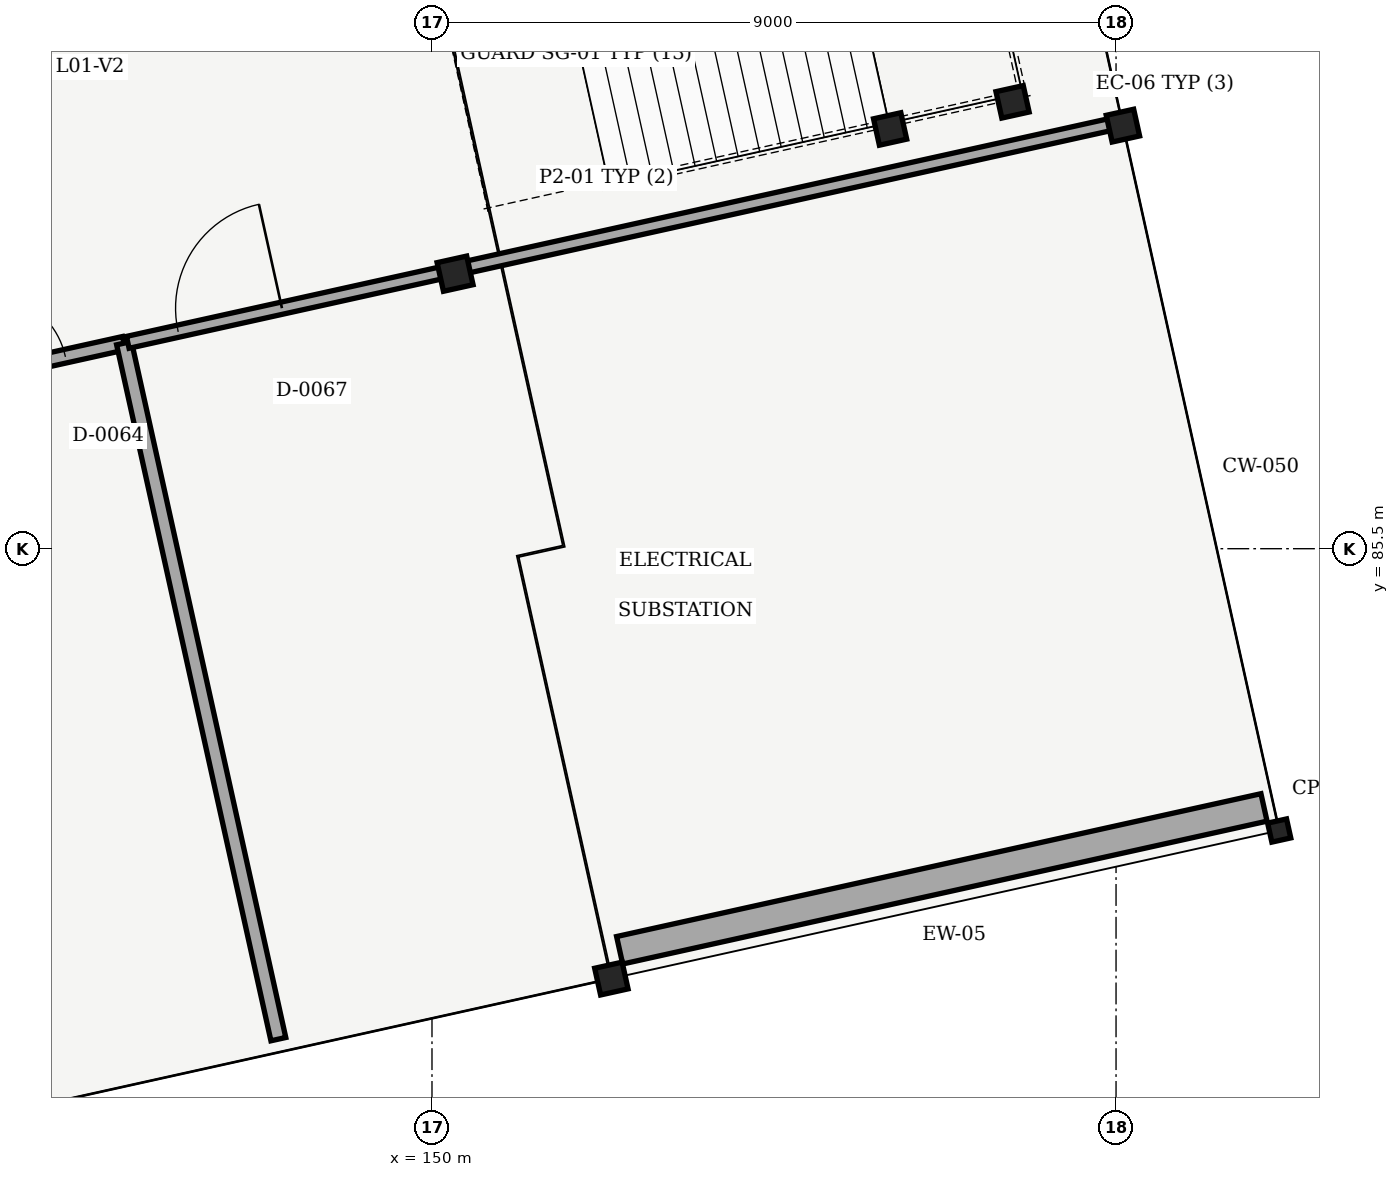
"""IFC4 building model, lengths in metres.
Left out: names, types, materials, properties, quantities, classifications, styles, units other than length and angle.
Written with IfcOpenShell. Run it as: python <this file> out.ifc"""

import sys

from ifc_helpers import new_model, si_unit, direction, frame, frame_2d, origin, origin_with_axes, origin_2d, place, context, subcontext, project, spatial, rectangle, i_section, extrude, element, fill, save


model = new_model("IFC4")
c1 = context("Model", 3, precision=1e-05, world=origin(), true_north=direction((0.0, 1.0)))
c2 = subcontext(c1, "Body", "Model", "MODEL_VIEW")
j1 = project(units=[si_unit("LENGTHUNIT", "METRE"), si_unit("PLANEANGLEUNIT", "RADIAN")], contexts=[c1])
p1 = place(None, origin())
s1 = spatial("IfcSite", under=j1, at=p1, CompositionType="ELEMENT")
p2 = place(p1, origin())
s2 = spatial("IfcBuilding", under=s1, at=p2, CompositionType="ELEMENT")
p3 = place(p2, frame((0.0, 0.0, 4.8)))
s3 = spatial("IfcBuildingStorey", under=s2, at=p3, CompositionType="ELEMENT", Elevation=4.8)
p4 = place(p3, frame((152.36, 79.844, 0.0), z_axis=(0.0, 0.0, 1.0), x_axis=(0.97629600712, 0.216439613938, 0.0)))
e1 = element("IfcColumn", 1, at=p4, inside=s3, PredefinedType="COLUMN", context=c2, shape_type="SweptSolid", body=[
    extrude(i_section(OverallWidth=0.37, OverallDepth=0.36, WebThickness=0.012, FlangeThickness=0.02, FilletRadius=0.015, at=origin_2d()), origin(), (0.0, 0.0, 1.0), 4.8),
])
p5 = place(p3, frame((150.304, 89.119, 0.0), z_axis=(0.0, 0.0, 1.0), x_axis=(0.97629600712, 0.216439613938, 0.0)))
e2 = element("IfcColumn", 2, at=p5, inside=s3, PredefinedType="COLUMN", context=c2, shape_type="SweptSolid", body=[
    extrude(i_section(OverallWidth=0.399, OverallDepth=0.386, WebThickness=0.021, FlangeThickness=0.033, FilletRadius=0.015, at=origin_2d()), origin(), (0.0, 0.0, 1.0), 4.8),
])
p6 = place(p3, frame((161.147, 81.792, 0.0), z_axis=(0.0, 0.0, 1.0), x_axis=(0.97629600712, 0.216439613938, 0.0)))
e3 = element("IfcColumn", 3, at=p6, inside=s3, PredefinedType="PILASTER", context=c2, shape_type="SweptSolid", body=[
    extrude(i_section(OverallWidth=0.255, OverallDepth=0.256, WebThickness=0.01, FlangeThickness=0.016, FilletRadius=0.009, at=origin_2d()), origin(), (0.0, 0.0, 1.0), 4.8),
])
p7 = place(p3, frame((159.091, 91.067, 0.0), z_axis=(0.0, 0.0, 1.0), x_axis=(0.97629600712, 0.216439613938, 0.0)))
e4 = element("IfcColumn", 4, at=p7, inside=s3, PredefinedType="COLUMN", context=c2, shape_type="SweptSolid", body=[
    extrude(i_section(OverallWidth=0.37, OverallDepth=0.36, WebThickness=0.012, FlangeThickness=0.02, FilletRadius=0.015, at=origin_2d()), origin(), (0.0, 0.0, 1.0), 4.8),
])
p8 = place(p3, frame((160.947, 82.096, 0.0), z_axis=(0.0, 0.0, 1.0), x_axis=(-0.976296752524, -0.216436251611, 0.0)))
e5 = element("IfcWall", 5, at=p8, inside=s3, PredefinedType="SOLIDWALL", context=c2, shape_type="SweptSolid", body=[
    extrude(rectangle(XDim=8.683, YDim=0.37, at=frame_2d((4.342, 0.0))), origin(), (0.0, 0.0, 1.0), 3.4),
])
for number, where, z_axis, x_axis in (
    (6, (156.027, 91.023, 0.0), (0.0, 0.0, 1.0), (0.976, 0.216, 0.0)),
    (7, (157.638, 91.38, 0.0), (0.0, 0.0, 1.0), (0.976, 0.216, 0.0)),
):
    element("IfcColumn", number, at=place(p3, frame(where, z_axis=z_axis, x_axis=x_axis)), inside=s3, PredefinedType="COLUMN", context=c2, shape_type="SweptSolid", body=[
        extrude(i_section(OverallWidth=0.368, OverallDepth=0.356, WebThickness=0.011, FlangeThickness=0.018, FilletRadius=0.015, at=origin_2d()), origin(), (0.0, 0.0, 1.0), 4.8),
    ])
p9 = place(p3, frame((124.099, 83.36, 0.0), z_axis=(0.0, 0.0, 1.0), x_axis=(0.976295512731, 0.216441843972, 0.0)))
e8 = element("IfcWall", 8, at=p9, inside=s3, PredefinedType="PARTITIONING", context=c2, shape_type="SweptSolid", body=[
    extrude(rectangle(XDim=22.38, YDim=0.18, at=frame_2d((11.19, 0.0))), origin(), (0.0, 0.0, 1.0), 3.38),
])
p10 = place(p9, frame((20.538, 0.0, 0.0)))
e9 = element("IfcOpeningElement", 9, at=p10, cuts=e8, PredefinedType="OPENING", context=c2, shape_type="SweptSolid", body=[
    extrude(rectangle(XDim=1.05, YDim=2.15, at=frame_2d((0.525, 1.075))), frame((0.0, 0.1, 0.0), z_axis=(0.0, -1.0, 0.0), x_axis=(1.0, 0.0, 0.0)), (0.0, 0.0, 1.0), 0.2),
])
p11 = place(p3, frame((145.948, 88.204, 0.0), z_axis=(0.0, 0.0, 1.0), x_axis=(0.216445399334, -0.97629472451, 0.0)))
e10 = element("IfcWall", 10, at=p11, inside=s3, PredefinedType="PARTITIONING", context=c2, shape_type="SweptSolid", body=[
    extrude(rectangle(XDim=9.38, YDim=0.2, at=frame_2d((4.69, 0.0))), origin(), (0.0, 0.0, 1.0), 3.38),
])
p12 = place(p3, frame((145.997, 88.215, 0.0), z_axis=(0.0, 0.0, 1.0), x_axis=(0.976295056142, 0.216443903478, 0.0)))
e11 = element("IfcWall", 11, at=p12, inside=s3, PredefinedType="PARTITIONING", context=c2, shape_type="SweptSolid", body=[
    extrude(rectangle(XDim=13.23, YDim=0.16, at=frame_2d((6.615, 0.0))), origin(), (0.0, 0.0, 1.0), 3.38),
])
p13 = place(p12, frame((0.678, 0.0, 0.0)))
e12 = element("IfcOpeningElement", 12, at=p13, cuts=e11, PredefinedType="OPENING", context=c2, shape_type="SweptSolid", body=[
    extrude(rectangle(XDim=1.4, YDim=2.2, at=frame_2d((0.7, 1.1))), frame((0.0, 0.09, 0.0), z_axis=(0.0, -1.0, 0.0), x_axis=(1.0, 0.0, 0.0)), (0.0, 0.0, 1.0), 0.18),
])
p14 = place(p10, origin_with_axes())
e13 = element("IfcDoor", 13, at=p14, inside=s3, OperationType="SINGLE_SWING_LEFT", PredefinedType="DOOR", context=c2, shape_type="SweptSolid", body=[
    extrude(rectangle(XDim=1.05, YDim=2.15, at=frame_2d((0.525, 1.075))), frame((0.0, 0.025, 0.0), z_axis=(0.0, -1.0, 0.0), x_axis=(1.0, 0.0, 0.0)), (0.0, 0.0, 1.0), 0.05),
])
fill(e9, e13)
p15 = place(p13, origin_with_axes())
e14 = element("IfcDoor", 14, at=p15, inside=s3, OperationType="SINGLE_SWING_RIGHT", PredefinedType="DOOR", context=c2, shape_type="SweptSolid", body=[
    extrude(rectangle(XDim=1.4, YDim=2.2, at=frame_2d((0.7, 1.1))), frame((0.0, 0.025, 0.0), z_axis=(0.0, -1.0, 0.0), x_axis=(1.0, 0.0, 0.0)), (0.0, 0.0, 1.0), 0.05),
])
fill(e12, e14)
save(model, sys.argv[1])
